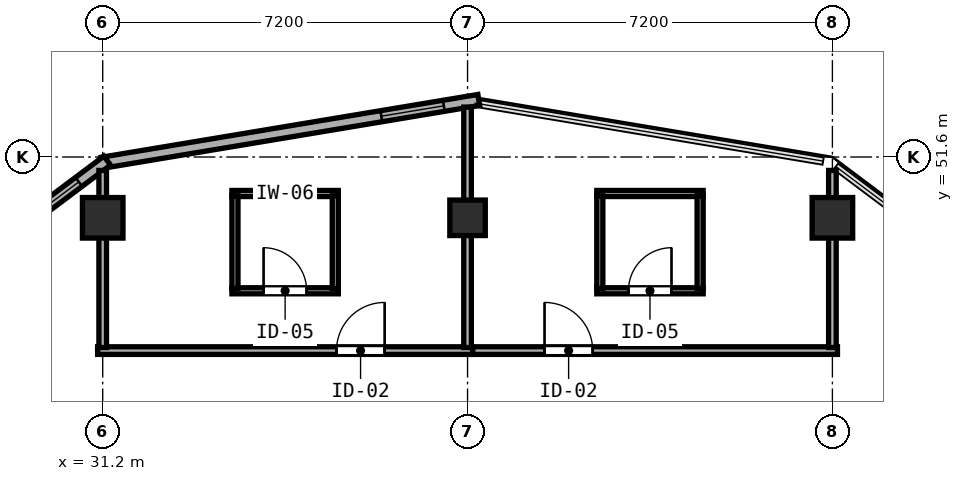
"""IFC4 building model, lengths in metres.
Left out: names, types, materials, properties, quantities, classifications, styles, units other than length and angle.
Written with IfcOpenShell. Run it as: python <this file> out.ifc"""

import sys

from ifc_helpers import new_model, si_unit, direction, frame, frame_2d, origin, origin_2d, place, context, subcontext, project, spatial, rectangle, hollow_rectangle, extrude, element, fill, save


model = new_model("IFC4")
c1 = context("Model", 3, precision=1e-05, world=origin(), true_north=direction((0.0, 1.0)))
c2 = subcontext(c1, "Body", "Model", "MODEL_VIEW")
j1 = project(units=[si_unit("LENGTHUNIT", "METRE"), si_unit("PLANEANGLEUNIT", "RADIAN")], contexts=[c1])
p1 = place(None, origin())
s1 = spatial("IfcSite", under=j1, at=p1, CompositionType="ELEMENT")
p2 = place(p1, origin())
s2 = spatial("IfcBuilding", under=s1, at=p2, CompositionType="ELEMENT")
p3 = place(p2, frame((0.0, 0.0, 254.45)))
s3 = spatial("IfcBuildingStorey", under=s2, at=p3, CompositionType="ELEMENT", Elevation=254.45)
for number, where, z_axis, x_axis in (
    (1, (31.2, 50.4, 0.0), (0.0, 0.0, 1.0), (1.0, 0.0, 0.0)),
    (2, (45.6, 50.4, 0.0), (0.0, 0.0, 1.0), (1.0, 0.0, 0.0)),
):
    element("IfcColumn", number, at=place(p3, frame(where, z_axis=z_axis, x_axis=x_axis)), inside=s3, PredefinedType="COLUMN", context=c2, shape_type="SweptSolid", body=[
        extrude(hollow_rectangle(XDim=0.8, YDim=0.8, WallThickness=0.03, at=origin_2d()), origin(), (0.0, 0.0, 1.0), 3.85),
    ])
p4 = place(p3, frame((38.4, 50.4, 0.0), z_axis=(0.0, 0.0, 1.0), x_axis=(1.0, 0.0, 0.0)))
e3 = element("IfcColumn", 3, at=p4, inside=s3, PredefinedType="COLUMN", context=c2, shape_type="SweptSolid", body=[
    extrude(hollow_rectangle(XDim=0.7, YDim=0.7, WallThickness=0.026, at=origin_2d()), origin(), (0.0, 0.0, 1.0), 3.85),
])
p5 = place(p3, frame((38.622, 52.726, 0.0), z_axis=(0.0, 0.0, 1.0), x_axis=(-0.986390420428, -0.164420006349, 0.0)))
e4 = element("IfcWall", 4, at=p5, inside=s3, PredefinedType="SOLIDWALL", context=c2, shape_type="SweptSolid", body=[
    extrude(rectangle(XDim=7.534, YDim=0.22, at=frame_2d((3.767, 0.0))), origin(), (0.0, 0.0, 1.0), 3.67),
])
p6 = place(p5, frame((0.7, 0.0, 0.85)))
e5 = element("IfcOpeningElement", 5, at=p6, cuts=e4, PredefinedType="OPENING", context=c2, shape_type="SweptSolid", body=[
    extrude(rectangle(XDim=1.25, YDim=1.95, at=frame_2d((0.625, 0.975))), frame((0.0, 0.12, 0.0), z_axis=(0.0, -1.0, 0.0), x_axis=(1.0, 0.0, 0.0)), (0.0, 0.0, 1.0), 0.24),
])
p7 = place(p3, frame((31.289, 51.529, 0.0), z_axis=(0.0, 0.0, 1.0), x_axis=(-0.800014580093, -0.599980559383, 0.0)))
e6 = element("IfcWall", 6, at=p7, inside=s3, PredefinedType="SOLIDWALL", context=c2, shape_type="SweptSolid", body=[
    extrude(rectangle(XDim=6.028, YDim=0.22, at=frame_2d((3.014, 0.0))), origin(), (0.0, 0.0, 1.0), 3.67),
])
p8 = place(p7, frame((0.7, 0.0, 0.85)))
e7 = element("IfcOpeningElement", 7, at=p8, cuts=e6, PredefinedType="OPENING", context=c2, shape_type="SweptSolid", body=[
    extrude(rectangle(XDim=1.25, YDim=1.95, at=frame_2d((0.625, 0.975))), frame((0.0, 0.12, 0.0), z_axis=(0.0, -1.0, 0.0), x_axis=(1.0, 0.0, 0.0)), (0.0, 0.0, 1.0), 0.24),
])
p9 = place(p3, frame((31.1, 47.78, 0.0), z_axis=(0.0, 0.0, 1.0), x_axis=(1.0, 0.0, 0.0)))
e8 = element("IfcWall", 8, at=p9, inside=s3, PredefinedType="PARTITIONING", context=c2, shape_type="SweptSolid", body=[
    extrude(rectangle(XDim=7.4, YDim=0.15, at=frame_2d((3.7, 0.0))), origin(), (0.0, 0.0, 1.0), 3.67),
])
p10 = place(p9, frame((4.714, 0.0, 0.0)))
e9 = element("IfcOpeningElement", 9, at=p10, cuts=e8, PredefinedType="OPENING", context=c2, shape_type="SweptSolid", body=[
    extrude(rectangle(XDim=0.95, YDim=2.15, at=frame_2d((0.475, 1.075))), frame((0.0, 0.085, 0.0), z_axis=(0.0, -1.0, 0.0), x_axis=(1.0, 0.0, 0.0)), (0.0, 0.0, 1.0), 0.17),
])
p11 = place(p3, frame((31.2, 47.84, 0.0), z_axis=(0.0, 0.0, 1.0), x_axis=(0.0, 1.0, 0.0)))
e10 = element("IfcWall", 10, at=p11, inside=s3, PredefinedType="PARTITIONING", context=c2, shape_type="SweptSolid", body=[
    extrude(rectangle(XDim=3.495, YDim=0.15, at=frame_2d((1.748, 0.0))), origin(), (0.0, 0.0, 1.0), 3.205),
])
p12 = place(p3, frame((38.4, 47.84, 0.0), z_axis=(0.0, 0.0, 1.0), x_axis=(0.0, 1.0, 0.0)))
e11 = element("IfcWall", 11, at=p12, inside=s3, PredefinedType="PARTITIONING", context=c2, shape_type="SweptSolid", body=[
    extrude(rectangle(XDim=4.745, YDim=0.15, at=frame_2d((2.373, 0.0))), origin(), (0.0, 0.0, 1.0), 3.67),
])
p13 = place(p3, frame((33.75, 50.88, 0.0), z_axis=(0.0, 0.0, 1.0), x_axis=(1.0, 0.0, 0.0)))
e12 = element("IfcWall", 12, at=p13, inside=s3, PredefinedType="PARTITIONING", context=c2, shape_type="SweptSolid", body=[
    extrude(rectangle(XDim=2.1, YDim=0.12, at=frame_2d((1.05, 0.0))), origin(), (0.0, 0.0, 1.0), 3.67),
])
p14 = place(p3, frame((33.75, 48.96, 0.0), z_axis=(0.0, 0.0, 1.0), x_axis=(1.0, 0.0, 0.0)))
e13 = element("IfcWall", 13, at=p14, inside=s3, PredefinedType="PARTITIONING", context=c2, shape_type="SweptSolid", body=[
    extrude(rectangle(XDim=2.1, YDim=0.12, at=frame_2d((1.05, 0.0))), origin(), (0.0, 0.0, 1.0), 3.67),
])
p15 = place(p14, frame((0.625, 0.0, 0.0)))
e14 = element("IfcOpeningElement", 14, at=p15, cuts=e13, PredefinedType="OPENING", context=c2, shape_type="SweptSolid", body=[
    extrude(rectangle(XDim=0.85, YDim=2.1, at=frame_2d((0.425, 1.05))), frame((0.0, 0.07, 0.0), z_axis=(0.0, -1.0, 0.0), x_axis=(1.0, 0.0, 0.0)), (0.0, 0.0, 1.0), 0.14),
])
for number, where, z_axis, x_axis in (
    (15, (33.81, 49.005, 0.0), (0.0, 0.0, 1.0), (0.0, 1.0, 0.0)),
    (16, (35.79, 49.005, 0.0), (0.0, 0.0, 1.0), (0.0, 1.0, 0.0)),
):
    element("IfcWall", number, at=place(p3, frame(where, z_axis=z_axis, x_axis=x_axis)), inside=s3, PredefinedType="PARTITIONING", context=c2, shape_type="SweptSolid", body=[
        extrude(rectangle(XDim=1.83, YDim=0.12, at=frame_2d((0.915, 0.0))), origin(), (0.0, 0.0, 1.0), 3.67),
    ])
p16 = place(p3, frame((38.502, 47.78, 0.0), z_axis=(0.0, 0.0, 1.0), x_axis=(1.0, 0.0, 0.0)))
e17 = element("IfcWall", 17, at=p16, inside=s3, PredefinedType="PARTITIONING", context=c2, shape_type="SweptSolid", body=[
    extrude(rectangle(XDim=7.198, YDim=0.15, at=frame_2d((3.599, 0.0))), origin(), (0.0, 0.0, 1.0), 3.67),
])
p17 = place(p16, frame((1.417, 0.0, 0.0)))
e18 = element("IfcOpeningElement", 18, at=p17, cuts=e17, PredefinedType="OPENING", context=c2, shape_type="SweptSolid", body=[
    extrude(rectangle(XDim=0.95, YDim=2.15, at=frame_2d((0.475, 1.075))), frame((0.0, 0.085, 0.0), z_axis=(0.0, -1.0, 0.0), x_axis=(1.0, 0.0, 0.0)), (0.0, 0.0, 1.0), 0.17),
])
p18 = place(p3, frame((45.6, 47.84, 0.0), z_axis=(0.0, 0.0, 1.0), x_axis=(0.0, 1.0, 0.0)))
e19 = element("IfcWall", 19, at=p18, inside=s3, PredefinedType="PARTITIONING", context=c2, shape_type="SweptSolid", body=[
    extrude(rectangle(XDim=3.495, YDim=0.15, at=frame_2d((1.748, 0.0))), origin(), (0.0, 0.0, 1.0), 3.205),
])
p19 = place(p3, frame((40.95, 50.88, 0.0), z_axis=(0.0, 0.0, 1.0), x_axis=(1.0, 0.0, 0.0)))
e20 = element("IfcWall", 20, at=p19, inside=s3, PredefinedType="PARTITIONING", context=c2, shape_type="SweptSolid", body=[
    extrude(rectangle(XDim=2.1, YDim=0.12, at=frame_2d((1.05, 0.0))), origin(), (0.0, 0.0, 1.0), 3.67),
])
p20 = place(p3, frame((40.95, 48.96, 0.0), z_axis=(0.0, 0.0, 1.0), x_axis=(1.0, 0.0, 0.0)))
e21 = element("IfcWall", 21, at=p20, inside=s3, PredefinedType="PARTITIONING", context=c2, shape_type="SweptSolid", body=[
    extrude(rectangle(XDim=2.1, YDim=0.12, at=frame_2d((1.05, 0.0))), origin(), (0.0, 0.0, 1.0), 3.67),
])
p21 = place(p20, frame((0.625, 0.0, 0.0)))
e22 = element("IfcOpeningElement", 22, at=p21, cuts=e21, PredefinedType="OPENING", context=c2, shape_type="SweptSolid", body=[
    extrude(rectangle(XDim=0.85, YDim=2.1, at=frame_2d((0.425, 1.05))), frame((0.0, 0.07, 0.0), z_axis=(0.0, -1.0, 0.0), x_axis=(1.0, 0.0, 0.0)), (0.0, 0.0, 1.0), 0.14),
])
for number, where, z_axis, x_axis in (
    (23, (41.01, 49.005, 0.0), (0.0, 0.0, 1.0), (0.0, 1.0, 0.0)),
    (24, (42.99, 49.005, 0.0), (0.0, 0.0, 1.0), (0.0, 1.0, 0.0)),
):
    element("IfcWall", number, at=place(p3, frame(where, z_axis=z_axis, x_axis=x_axis)), inside=s3, PredefinedType="PARTITIONING", context=c2, shape_type="SweptSolid", body=[
        extrude(rectangle(XDim=1.83, YDim=0.12, at=frame_2d((0.915, 0.0))), origin(), (0.0, 0.0, 1.0), 3.67),
    ])
p22 = place(p6, origin())
e25 = element("IfcWindow", 25, at=p22, inside=s3, PartitioningType="SINGLE_PANEL", PredefinedType="WINDOW", context=c2, shape_type="SweptSolid", body=[
    extrude(rectangle(XDim=1.25, YDim=1.95, at=frame_2d((0.625, 0.975))), frame((0.0, 0.03, 0.0), z_axis=(0.0, -1.0, 0.0), x_axis=(1.0, 0.0, 0.0)), (0.0, 0.0, 1.0), 0.06),
])
fill(e5, e25)
p23 = place(p8, origin())
e26 = element("IfcWindow", 26, at=p23, inside=s3, PartitioningType="SINGLE_PANEL", PredefinedType="WINDOW", context=c2, shape_type="SweptSolid", body=[
    extrude(rectangle(XDim=1.25, YDim=1.95, at=frame_2d((0.625, 0.975))), frame((0.0, 0.03, 0.0), z_axis=(0.0, -1.0, 0.0), x_axis=(1.0, 0.0, 0.0)), (0.0, 0.0, 1.0), 0.06),
])
fill(e7, e26)
p24 = place(p10, origin())
e27 = element("IfcDoor", 27, at=p24, inside=s3, OperationType="SINGLE_SWING_RIGHT", PredefinedType="DOOR", context=c2, shape_type="SweptSolid", body=[
    extrude(rectangle(XDim=0.95, YDim=2.15, at=frame_2d((0.475, 1.075))), frame((0.0, 0.025, 0.0), z_axis=(0.0, -1.0, 0.0), x_axis=(1.0, 0.0, 0.0)), (0.0, 0.0, 1.0), 0.05),
])
fill(e9, e27)
p25 = place(p15, origin())
e28 = element("IfcDoor", 28, at=p25, inside=s3, OperationType="SINGLE_SWING_LEFT", PredefinedType="DOOR", context=c2, shape_type="SweptSolid", body=[
    extrude(rectangle(XDim=0.85, YDim=2.1, at=frame_2d((0.425, 1.05))), frame((0.0, 0.025, 0.0), z_axis=(0.0, -1.0, 0.0), x_axis=(1.0, 0.0, 0.0)), (0.0, 0.0, 1.0), 0.05),
])
fill(e14, e28)
p26 = place(p17, origin())
e29 = element("IfcDoor", 29, at=p26, inside=s3, OperationType="SINGLE_SWING_LEFT", PredefinedType="DOOR", context=c2, shape_type="SweptSolid", body=[
    extrude(rectangle(XDim=0.95, YDim=2.15, at=frame_2d((0.475, 1.075))), frame((0.0, 0.025, 0.0), z_axis=(0.0, -1.0, 0.0), x_axis=(1.0, 0.0, 0.0)), (0.0, 0.0, 1.0), 0.05),
])
fill(e18, e29)
p27 = place(p21, origin())
e30 = element("IfcDoor", 30, at=p27, inside=s3, OperationType="SINGLE_SWING_RIGHT", PredefinedType="DOOR", context=c2, shape_type="SweptSolid", body=[
    extrude(rectangle(XDim=0.85, YDim=2.1, at=frame_2d((0.425, 1.05))), frame((0.0, 0.025, 0.0), z_axis=(0.0, -1.0, 0.0), x_axis=(1.0, 0.0, 0.0)), (0.0, 0.0, 1.0), 0.05),
])
fill(e22, e30)
save(model, sys.argv[1])
